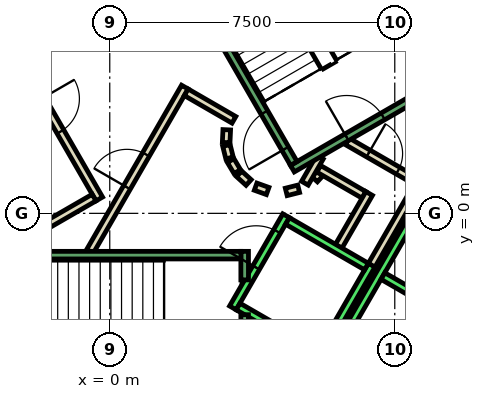
"""IFC4 building model, lengths in metres.
Left out: names, types, materials, properties, quantities, classifications, styles, units other than length and angle.
Written with IfcOpenShell. Run it as: python <this file> out.ifc"""

import sys

from ifc_helpers import new_model, si_unit, direction, frame, frame_2d, origin, place, context, subcontext, project, spatial, polyline, rectangle, outline, extrude, element, fill, save


model = new_model("IFC4")
c1 = context("Model", 3, precision=1e-05, world=origin(), true_north=direction((0.0, 1.0)))
c2 = subcontext(c1, "Body", "Model", "MODEL_VIEW")
j1 = project(units=[si_unit("LENGTHUNIT", "METRE"), si_unit("PLANEANGLEUNIT", "RADIAN")], contexts=[c1])
p1 = place(None, origin())
s1 = spatial("IfcSite", under=j1, at=p1, CompositionType="ELEMENT")
p2 = place(p1, origin())
s2 = spatial("IfcBuilding", under=s1, at=p2, CompositionType="ELEMENT")
p3 = place(p2, frame((0.0, 0.0, 77.0)))
s3 = spatial("IfcBuildingStorey", under=s2, at=p3, CompositionType="ELEMENT", Elevation=77.0)
p4 = place(p3, frame((0.0, 0.0, -0.4)))
e1 = element("IfcWall", 1, at=p4, inside=s3, PredefinedType="SHEAR", context=c2, shape_type="SweptSolid", body=[
    extrude(outline(polyline([(8.517, 11.748), (7.694, 11.273), (12.759, 2.5), (13.856, 2.5), (8.517, 11.748)])), origin(), (0.0, 0.0, 1.0), 4.0),
])
p5 = place(p3, frame((5.39, 0.898, 0.0), z_axis=(0.0, 0.0, 1.0), x_axis=(0.673828488714, 0.738887791073, 0.0)))
e2 = element("IfcWall", 2, at=p5, inside=s3, PredefinedType="PARTITIONING", context=c2, shape_type="SweptSolid", body=[
    extrude(rectangle(XDim=0.263, YDim=0.2, at=frame_2d((0.131, 0.0))), origin(), (0.0, 0.0, 1.0), 3.6),
])
p6 = place(p3, frame((5.499, 1.172, 0.0), z_axis=(0.0, 0.0, 1.0), x_axis=(0.866333505267, -0.499465972466, 0.0)))
e3 = element("IfcWall", 3, at=p6, inside=s3, PredefinedType="PARTITIONING", context=c2, shape_type="SweptSolid", body=[
    extrude(rectangle(XDim=1.374, YDim=0.2, at=frame_2d((0.687, 0.0))), origin(), (0.0, 0.0, 1.0), 3.6),
])
p7 = place(p3, frame((6.826, 0.522, 0.0), z_axis=(0.0, 0.0, 1.0), x_axis=(-0.500016722714, -0.866015748706, 0.0)))
e4 = element("IfcWall", 4, at=p7, inside=s3, PredefinedType="PARTITIONING", context=c2, shape_type="SweptSolid", body=[
    extrude(rectangle(XDim=1.7, YDim=0.2, at=frame_2d((0.85, 0.0))), origin(), (0.0, 0.0, 1.0), 3.6),
])
p8 = place(p3, frame((6.25, 1.894, 0.0), z_axis=(0.0, 0.0, 1.0), x_axis=(0.866043184279, -0.499969202016, 0.0)))
e5 = element("IfcWall", 5, at=p8, inside=s3, PredefinedType="PARTITIONING", context=c2, shape_type="SweptSolid", body=[
    extrude(rectangle(XDim=2.084, YDim=0.2, at=frame_2d((1.042, 0.0))), origin(), (0.0, 0.0, 1.0), 3.6),
])
p9 = place(p8, frame((0.642, 0.0, 0.0)))
e6 = element("IfcOpeningElement", 6, at=p9, cuts=e5, PredefinedType="OPENING", context=c2, shape_type="SweptSolid", body=[
    extrude(rectangle(XDim=0.9, YDim=2.1, at=frame_2d((0.45, 1.05))), frame((0.0, 0.11, 0.0), z_axis=(0.0, -1.0, 0.0), x_axis=(1.0, 0.0, 0.0)), (0.0, 0.0, 1.0), 0.22),
])
p10 = place(p3, frame((8.192, 0.888, 0.0), z_axis=(0.0, 0.0, 1.0), x_axis=(-0.499940625693, -0.866059680843, 0.0)))
e7 = element("IfcWall", 7, at=p10, inside=s3, PredefinedType="PARTITIONING", context=c2, shape_type="SweptSolid", body=[
    extrude(rectangle(XDim=2.68, YDim=0.2, at=frame_2d((1.34, 0.0))), origin(), (0.0, 0.0, 1.0), 3.6),
])
p11 = place(p3, frame((5.135, 0.793, 0.0), z_axis=(0.0, 0.0, 1.0), x_axis=(0.499526442893, 0.866298639529, 0.0)))
e8 = element("IfcWall", 8, at=p11, inside=s3, PredefinedType="PARTITIONING", context=c2, shape_type="SweptSolid", body=[
    extrude(rectangle(XDim=0.791, YDim=0.2, at=frame_2d((0.396, 0.0))), origin(), (0.0, 0.0, 1.0), 3.6),
])
p12 = place(p3, frame((-0.52, -1.0, 0.0), z_axis=(0.0, 0.0, 1.0), x_axis=(0.50011622646, 0.865958290007, 0.0)))
e9 = element("IfcWall", 9, at=p12, inside=s3, PredefinedType="PARTITIONING", context=c2, shape_type="SweptSolid", body=[
    extrude(rectangle(XDim=4.991, YDim=0.2, at=frame_2d((2.496, 0.0))), origin(), (0.0, 0.0, 1.0), 3.6),
])
p13 = place(p12, frame((1.945, 0.0, 0.0)))
e10 = element("IfcOpeningElement", 10, at=p13, cuts=e9, PredefinedType="OPENING", context=c2, shape_type="SweptSolid", body=[
    extrude(rectangle(XDim=1.0, YDim=2.1, at=frame_2d((0.5, 1.05))), frame((0.0, 0.11, 0.0), z_axis=(0.0, -1.0, 0.0), x_axis=(1.0, 0.0, 0.0)), (0.0, 0.0, 1.0), 0.22),
])
p14 = place(p3, frame((2.012, 3.186, 0.0), z_axis=(0.0, 0.0, 1.0), x_axis=(0.865891012941, -0.500232699559, 0.0)))
e11 = element("IfcWall", 11, at=p14, inside=s3, PredefinedType="PARTITIONING", context=c2, shape_type="SweptSolid", body=[
    extrude(rectangle(XDim=1.449, YDim=0.2, at=frame_2d((0.725, 0.0))), origin(), (0.0, 0.0, 1.0), 3.6),
])
p15 = place(p3, frame((3.079, 2.199, 0.0), z_axis=(0.0, 0.0, 1.0), x_axis=(-0.047771483479, -0.998858290933, 0.0)))
e12 = element("IfcWall", 12, at=p15, inside=s3, PredefinedType="PARTITIONING", context=c2, shape_type="SweptSolid", body=[
    extrude(rectangle(XDim=0.337, YDim=0.2, at=frame_2d((0.169, 0.0))), origin(), (0.0, 0.0, 1.0), 3.6),
])
p16 = place(p3, frame((3.07, 1.786, 0.0), z_axis=(0.0, 0.0, 1.0), x_axis=(0.242705583207, -0.970099994784, 0.0)))
e13 = element("IfcWall", 13, at=p16, inside=s3, PredefinedType="PARTITIONING", context=c2, shape_type="SweptSolid", body=[
    extrude(rectangle(XDim=0.338, YDim=0.2, at=frame_2d((0.169, 0.0))), origin(), (0.0, 0.0, 1.0), 3.6),
])
for number, where, z_axis, x_axis in (
    (14, (3.182, 1.388, 0.0), (0.0, 0.0, 1.0), (0.512, -0.859, 0.0)),
    (15, (3.404, 1.039, 0.0), (0.0, 0.0, 1.0), (0.74, -0.672, 0.0)),
):
    element("IfcWall", number, at=place(p3, frame(where, z_axis=z_axis, x_axis=x_axis)), inside=s3, PredefinedType="PARTITIONING", context=c2, shape_type="SweptSolid", body=[
        extrude(rectangle(XDim=0.338, YDim=0.2, at=frame_2d((0.169, 0.0))), origin(), (0.0, 0.0, 1.0), 3.6),
    ])
p17 = place(p3, frame((3.838, 0.702, 0.0), z_axis=(0.0, 0.0, 1.0), x_axis=(0.941035081519, -0.338308993895, 0.0)))
e16 = element("IfcWall", 16, at=p17, inside=s3, PredefinedType="PARTITIONING", context=c2, shape_type="SweptSolid", body=[
    extrude(rectangle(XDim=0.337, YDim=0.2, at=frame_2d((0.168, 0.0))), origin(), (0.0, 0.0, 1.0), 3.6),
])
p18 = place(p3, frame((4.644, 0.564, 0.0), z_axis=(0.0, 0.0, 1.0), x_axis=(0.969929076366, 0.243387729394, 0.0)))
e17 = element("IfcWall", 17, at=p18, inside=s3, PredefinedType="PARTITIONING", context=c2, shape_type="SweptSolid", body=[
    extrude(rectangle(XDim=0.337, YDim=0.2, at=frame_2d((0.168, 0.0))), origin(), (0.0, 0.0, 1.0), 3.6),
])
p19 = place(p3, frame((-2.771, 4.7, 0.0), z_axis=(0.0, 0.0, 1.0), x_axis=(0.499969479948, -0.866043023828, 0.0)))
e18 = element("IfcWall", 18, at=p19, inside=s3, PredefinedType="PARTITIONING", context=c2, shape_type="SweptSolid", body=[
    extrude(rectangle(XDim=4.99, YDim=0.2, at=frame_2d((2.495, 0.0))), origin(), (0.0, 0.0, 1.0), 3.6),
])
p20 = place(p19, frame((1.945, 0.0, 0.0)))
e19 = element("IfcOpeningElement", 19, at=p20, cuts=e18, PredefinedType="OPENING", context=c2, shape_type="SweptSolid", body=[
    extrude(rectangle(XDim=1.0, YDim=2.1, at=frame_2d((0.5, 1.05))), frame((0.0, 0.11, 0.0), z_axis=(0.0, -1.0, 0.0), x_axis=(1.0, 0.0, 0.0)), (0.0, 0.0, 1.0), 0.22),
])
p21 = place(p3, frame((-0.412, 0.414, 0.0), z_axis=(0.0, 0.0, 1.0), x_axis=(-0.866017369001, -0.500013916395, 0.0)))
e20 = element("IfcWall", 20, at=p21, inside=s3, PredefinedType="PARTITIONING", context=c2, shape_type="SweptSolid", body=[
    extrude(rectangle(XDim=1.45, YDim=0.2, at=frame_2d((0.725, 0.0))), origin(), (0.0, 0.0, 1.0), 3.6),
])
p22 = place(p3, frame((3.24, -2.488, 0.0), z_axis=(0.0, 0.0, 1.0), x_axis=(0.49994636267, 0.866056369097, 0.0)))
e21 = element("IfcWall", 21, at=p22, inside=s3, PredefinedType="STANDARD", context=c2, shape_type="SweptSolid", body=[
    extrude(rectangle(XDim=2.8, YDim=0.2, at=frame_2d((1.4, 0.0))), origin(), (0.0, 0.0, 1.0), 3.6),
])
p23 = place(p22, frame((1.225, 0.0, 0.0)))
e22 = element("IfcOpeningElement", 22, at=p23, cuts=e21, PredefinedType="OPENING", context=c2, shape_type="SweptSolid", body=[
    extrude(rectangle(XDim=1.1, YDim=2.1, at=frame_2d((0.55, 1.05))), frame((0.0, 0.11, 0.0), z_axis=(0.0, -1.0, 0.0), x_axis=(1.0, 0.0, 0.0)), (0.0, 0.0, 1.0), 0.22),
])
p24 = place(p3, frame((5.492, -3.788, 0.0), z_axis=(0.0, 0.0, 1.0), x_axis=(0.500011755427, 0.866018616679, 0.0)))
e23 = element("IfcWall", 23, at=p24, inside=s3, PredefinedType="STANDARD", context=c2, shape_type="SweptSolid", body=[
    extrude(rectangle(XDim=2.8, YDim=0.2, at=frame_2d((1.4, 0.0))), origin(), (0.0, 0.0, 1.0), 3.6),
])
p25 = place(p3, frame((3.377, -2.452, 0.0), z_axis=(0.0, 0.0, 1.0), x_axis=(0.865955154139, -0.50012165622, 0.0)))
e24 = element("IfcWall", 24, at=p25, inside=s3, PredefinedType="STANDARD", context=c2, shape_type="SweptSolid", body=[
    extrude(rectangle(XDim=2.4, YDim=0.2, at=frame_2d((1.2, 0.0))), origin(), (0.0, 0.0, 1.0), 3.6),
])
p26 = place(p3, frame((4.677, -0.2, 0.0), z_axis=(0.0, 0.0, 1.0), x_axis=(0.865973769406, -0.500089422704, 0.0)))
e25 = element("IfcWall", 25, at=p26, inside=s3, PredefinedType="STANDARD", context=c2, shape_type="SweptSolid", body=[
    extrude(rectangle(XDim=2.399, YDim=0.2, at=frame_2d((1.2, 0.0))), origin(), (0.0, 0.0, 1.0), 3.6),
])
p27 = place(p3, frame((4.451, -6.19, 0.0), z_axis=(0.0, 0.0, 1.0), x_axis=(0.50000090737, 0.866024879913, 0.0)))
e26 = element("IfcWall", 26, at=p27, inside=s3, PredefinedType="STANDARD", context=c2, shape_type="SweptSolid", body=[
    extrude(rectangle(XDim=10.6, YDim=0.2, at=frame_2d((5.3, 0.0))), origin(), (0.0, 0.0, 1.0), 3.6),
])
p28 = place(p3, frame((7.188, -1.65, 0.0), z_axis=(0.0, 0.0, 1.0), x_axis=(0.866022959057, -0.500004234368, 0.0)))
e27 = element("IfcWall", 27, at=p28, inside=s3, PredefinedType="STANDARD", context=c2, shape_type="SweptSolid", body=[
    extrude(rectangle(XDim=2.5, YDim=0.2, at=frame_2d((1.25, 0.0))), origin(), (0.0, 0.0, 1.0), 3.6),
])
p29 = place(p3, frame((3.55, -2.667, 0.0), z_axis=(0.0, 0.0, 1.0), x_axis=(0.0, -1.0, 0.0)))
e28 = element("IfcWall", 28, at=p29, inside=s3, PredefinedType="STANDARD", context=c2, shape_type="SweptSolid", body=[
    extrude(rectangle(XDim=2.733, YDim=0.2, at=frame_2d((1.366, 0.0))), origin(), (0.0, 0.0, 1.0), 3.6),
])
p30 = place(p3, frame((3.55, -1.0, 0.0), z_axis=(0.0, 0.0, 1.0), x_axis=(0.0, -1.0, 0.0)))
e29 = element("IfcWall", 29, at=p30, inside=s3, PredefinedType="STANDARD", context=c2, shape_type="SweptSolid", body=[
    extrude(rectangle(XDim=0.751, YDim=0.2, at=frame_2d((0.375, 0.0))), origin(), (0.0, 0.0, 1.0), 3.6),
])
p31 = place(p3, frame((-3.45, -1.1, 0.0), z_axis=(0.0, 0.0, 1.0), x_axis=(1.0, 0.0, 0.0)))
e30 = element("IfcWall", 30, at=p31, inside=s3, PredefinedType="STANDARD", context=c2, shape_type="SweptSolid", body=[
    extrude(rectangle(XDim=6.9, YDim=0.2, at=frame_2d((3.45, 0.0))), origin(), (0.0, 0.0, 1.0), 3.6),
])
p32 = place(p31, frame((0.45, 0.0, 0.0)))
e31 = element("IfcOpeningElement", 31, at=p32, cuts=e30, PredefinedType="OPENING", context=c2, shape_type="SweptSolid", body=[
    extrude(rectangle(XDim=1.1, YDim=2.2, at=frame_2d((0.55, 1.1))), frame((0.0, 0.11, 0.0), z_axis=(0.0, -1.0, 0.0), x_axis=(1.0, 0.0, 0.0)), (0.0, 0.0, 1.0), 0.22),
])
p33 = place(p3, frame((4.806, 1.176, 0.0), z_axis=(0.0, 0.0, 1.0), x_axis=(0.866059941101, 0.499940174841, 0.0)))
e32 = element("IfcWall", 32, at=p33, inside=s3, PredefinedType="STANDARD", context=c2, shape_type="SweptSolid", body=[
    extrude(rectangle(XDim=4.4, YDim=0.2, at=frame_2d((2.2, 0.0))), origin(), (0.0, 0.0, 1.0), 3.6),
])
p34 = place(p33, frame((1.65, 0.0, 0.0)))
e33 = element("IfcOpeningElement", 33, at=p34, cuts=e32, PredefinedType="OPENING", context=c2, shape_type="SweptSolid", body=[
    extrude(rectangle(XDim=1.1, YDim=2.2, at=frame_2d((0.55, 1.1))), frame((0.0, 0.11, 0.0), z_axis=(0.0, -1.0, 0.0), x_axis=(1.0, 0.0, 0.0)), (0.0, 0.0, 1.0), 0.22),
])
p35 = place(p3, frame((4.843, 1.312, 0.0), z_axis=(0.0, 0.0, 1.0), x_axis=(-0.499963383562, 0.866046543262, 0.0)))
e34 = element("IfcWall", 34, at=p35, inside=s3, PredefinedType="STANDARD", context=c2, shape_type="SweptSolid", body=[
    extrude(rectangle(XDim=6.9, YDim=0.2, at=frame_2d((3.45, 0.0))), origin(), (0.0, 0.0, 1.0), 3.6),
])
p36 = place(p35, frame((0.45, 0.0, 0.0)))
e35 = element("IfcOpeningElement", 35, at=p36, cuts=e34, PredefinedType="OPENING", context=c2, shape_type="SweptSolid", body=[
    extrude(rectangle(XDim=1.1, YDim=2.2, at=frame_2d((0.55, 1.1))), frame((0.0, 0.11, 0.0), z_axis=(0.0, -1.0, 0.0), x_axis=(1.0, 0.0, 0.0)), (0.0, 0.0, 1.0), 0.22),
])
p37 = place(p3, frame((8.48, 3.412, 0.0), z_axis=(0.0, 0.0, 1.0), x_axis=(-0.499978703459, 0.866037698999, 0.0)))
e36 = element("IfcWall", 36, at=p37, inside=s3, PredefinedType="STANDARD", context=c2, shape_type="SweptSolid", body=[
    extrude(rectangle(XDim=6.9, YDim=0.2, at=frame_2d((3.45, 0.0))), origin(), (0.0, 0.0, 1.0), 3.6),
])
p38 = place(p3, frame((-1.393, 7.288, 0.0), z_axis=(0.0, 0.0, 1.0), x_axis=(-0.499963383562, -0.866046543262, 0.0)))
e37 = element("IfcWall", 37, at=p38, inside=s3, PredefinedType="STANDARD", context=c2, shape_type="SweptSolid", body=[
    extrude(rectangle(XDim=6.9, YDim=0.2, at=frame_2d((3.45, 0.0))), origin(), (0.0, 0.0, 1.0), 3.6),
])
p39 = place(p38, frame((0.45, 0.0, 0.0)))
e38 = element("IfcOpeningElement", 38, at=p39, cuts=e37, PredefinedType="OPENING", context=c2, shape_type="SweptSolid", body=[
    extrude(rectangle(XDim=1.1, YDim=2.2, at=frame_2d((0.55, 1.1))), frame((0.0, 0.11, 0.0), z_axis=(0.0, -1.0, 0.0), x_axis=(1.0, 0.0, 0.0)), (0.0, 0.0, 1.0), 0.22),
])
p40 = place(p13, origin())
e39 = element("IfcDoor", 39, at=p40, inside=s3, OperationType="SINGLE_SWING_LEFT", PredefinedType="DOOR", context=c2, shape_type="SweptSolid", body=[
    extrude(rectangle(XDim=1.0, YDim=2.1, at=frame_2d((0.5, 1.05))), frame((0.0, 0.025, 0.0), z_axis=(0.0, -1.0, 0.0), x_axis=(1.0, 0.0, 0.0)), (0.0, 0.0, 1.0), 0.05),
])
fill(e10, e39)
p41 = place(p20, origin())
e40 = element("IfcDoor", 40, at=p41, inside=s3, OperationType="SINGLE_SWING_RIGHT", PredefinedType="DOOR", context=c2, shape_type="SweptSolid", body=[
    extrude(rectangle(XDim=1.0, YDim=2.1, at=frame_2d((0.5, 1.05))), frame((0.0, 0.025, 0.0), z_axis=(0.0, -1.0, 0.0), x_axis=(1.0, 0.0, 0.0)), (0.0, 0.0, 1.0), 0.05),
])
fill(e19, e40)
p42 = place(p9, origin())
e41 = element("IfcDoor", 41, at=p42, inside=s3, OperationType="SINGLE_SWING_LEFT", PredefinedType="DOOR", context=c2, shape_type="SweptSolid", body=[
    extrude(rectangle(XDim=0.9, YDim=2.1, at=frame_2d((0.45, 1.05))), frame((0.0, 0.025, 0.0), z_axis=(0.0, -1.0, 0.0), x_axis=(1.0, 0.0, 0.0)), (0.0, 0.0, 1.0), 0.05),
])
fill(e6, e41)
p43 = place(p23, origin())
e42 = element("IfcDoor", 42, at=p43, inside=s3, OperationType="SLIDING_TO_LEFT", PredefinedType="DOOR", context=c2, shape_type="SweptSolid", body=[
    extrude(rectangle(XDim=1.1, YDim=2.1, at=frame_2d((0.55, 1.05))), frame((0.0, 0.025, 0.0), z_axis=(0.0, -1.0, 0.0), x_axis=(1.0, 0.0, 0.0)), (0.0, 0.0, 1.0), 0.05),
])
fill(e22, e42)
p44 = place(p36, origin())
e43 = element("IfcDoor", 43, at=p44, inside=s3, OperationType="SINGLE_SWING_LEFT", PredefinedType="DOOR", context=c2, shape_type="SweptSolid", body=[
    extrude(rectangle(XDim=1.1, YDim=2.2, at=frame_2d((0.55, 1.1))), frame((0.0, 0.025, 0.0), z_axis=(0.0, -1.0, 0.0), x_axis=(1.0, 0.0, 0.0)), (0.0, 0.0, 1.0), 0.05),
])
fill(e35, e43)
p45 = place(p34, origin())
e44 = element("IfcDoor", 44, at=p45, inside=s3, OperationType="SINGLE_SWING_LEFT", PredefinedType="DOOR", context=c2, shape_type="SweptSolid", body=[
    extrude(rectangle(XDim=1.1, YDim=2.2, at=frame_2d((0.55, 1.1))), frame((0.0, 0.025, 0.0), z_axis=(0.0, -1.0, 0.0), x_axis=(1.0, 0.0, 0.0)), (0.0, 0.0, 1.0), 0.05),
])
fill(e33, e44)
save(model, sys.argv[1])
